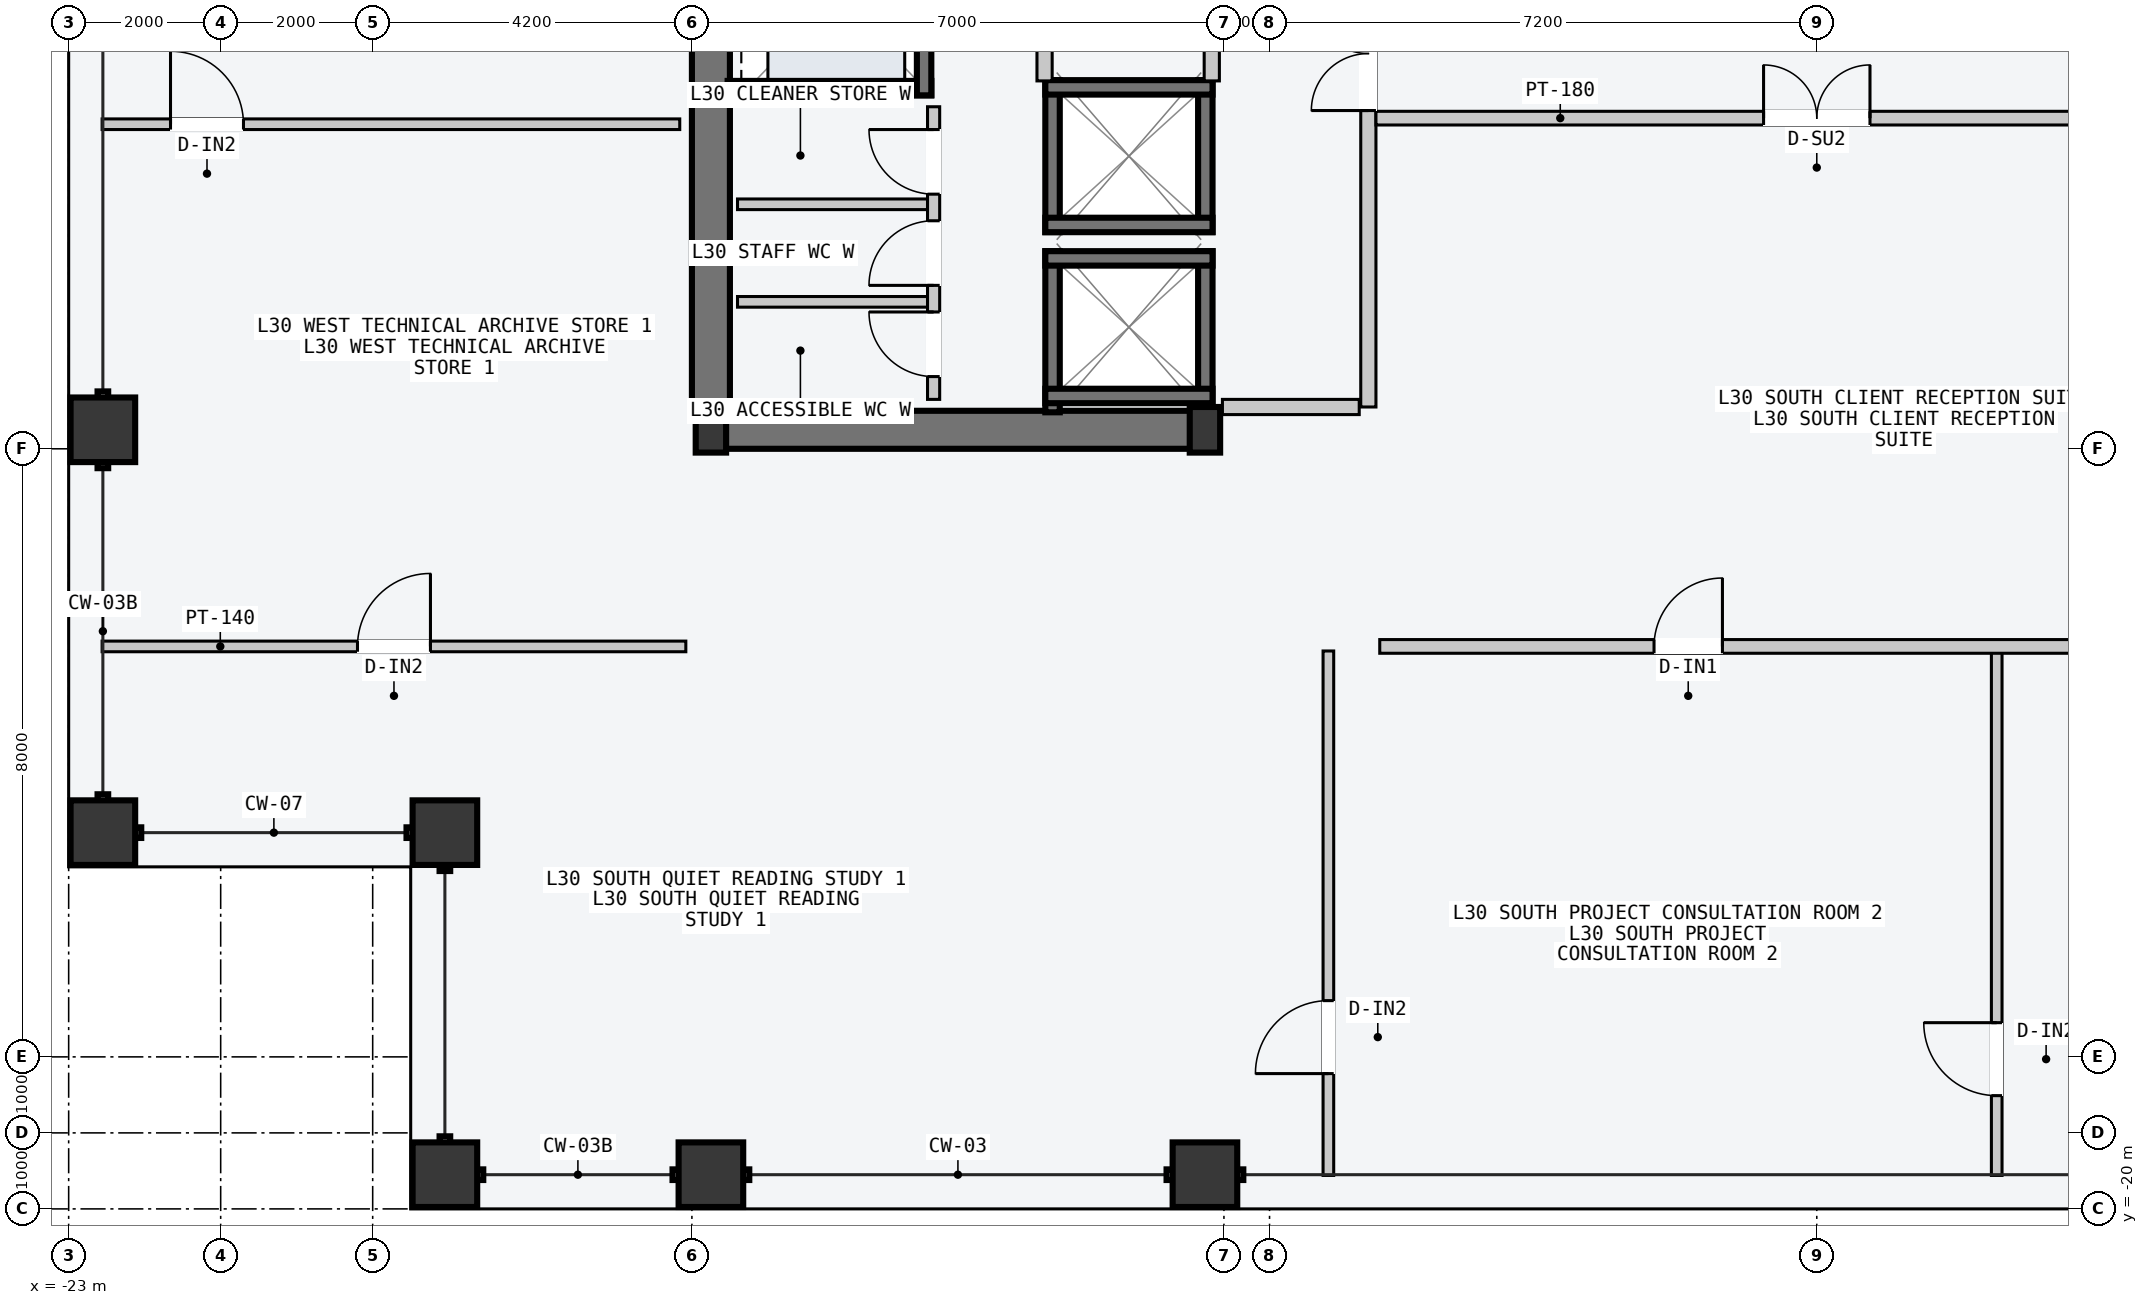
"""IFC4 building model, lengths in metres.
Left out: names, types, materials, properties, quantities, classifications, styles, units other than length and angle.
Written with IfcOpenShell. Run it as: python <this file> out.ifc"""

import sys

from ifc_helpers import new_model, si_unit, direction, frame, frame_2d, origin, origin_2d, place, context, subcontext, project, spatial, rectangle, hollow_rectangle, i_section, extrude, element, fill, save


model = new_model("IFC4")
c1 = context("Model", 3, precision=1e-05, world=origin(), true_north=direction((0.0, 1.0)))
c2 = subcontext(c1, "Body", "Model", "MODEL_VIEW")
j1 = project(units=[si_unit("LENGTHUNIT", "METRE"), si_unit("PLANEANGLEUNIT", "RADIAN")], contexts=[c1])
p1 = place(None, origin())
s1 = spatial("IfcSite", under=j1, at=p1, CompositionType="ELEMENT")
p2 = place(p1, origin())
s2 = spatial("IfcBuilding", under=s1, at=p2, CompositionType="ELEMENT")
p3 = place(p2, frame((0.0, 0.0, 117.0)))
s3 = spatial("IfcBuildingStorey", under=s2, at=p3, CompositionType="ELEMENT", Elevation=117.0)
p4 = place(p3, frame((-14.53, -9.75, -0.2), z_axis=(0.0, 0.0, 1.0), x_axis=(1.0, 0.0, 0.0)))
e1 = element("IfcWall", 1, at=p4, inside=s3, PredefinedType="SHEAR", context=c2, shape_type="SweptSolid", body=[
    extrude(rectangle(XDim=6.46, YDim=0.5, at=frame_2d((3.23, 0.0))), origin(), (0.0, 0.0, 1.0), 3.6),
])
p5 = place(p3, frame((-14.55, -9.45, -0.2), z_axis=(0.0, 0.0, 1.0), x_axis=(0.0, 1.0, 0.0)))
e2 = element("IfcWall", 2, at=p5, inside=s3, PredefinedType="SHEAR", context=c2, shape_type="SweptSolid", body=[
    extrude(rectangle(XDim=9.15, YDim=0.5, at=frame_2d((4.575, 0.0))), origin(), (0.0, 0.0, 1.0), 3.6),
])
for number, where, z_axis, x_axis in (
    (3, (-14.55, -9.75, 0.0), (0.0, 0.0, 1.0), (1.0, 0.0, 0.0)),
    (4, (-8.05, -9.75, 0.0), (0.0, 0.0, 1.0), (1.0, 0.0, 0.0)),
):
    element("IfcColumn", number, at=place(p3, frame(where, z_axis=z_axis, x_axis=x_axis)), inside=s3, PredefinedType="COLUMN", context=c2, shape_type="SweptSolid", body=[
        extrude(i_section(OverallWidth=0.4, OverallDepth=0.6, WebThickness=0.022, FlangeThickness=0.036, at=origin_2d()), origin(), (0.0, 0.0, 1.0), 3.6),
    ])
for number, where, z_axis, x_axis in (
    (5, (-18.05, -19.55, 0.0), (0.0, 0.0, 1.0), (1.0, 0.0, 0.0)),
    (6, (-14.55, -19.55, 0.0), (0.0, 0.0, 1.0), (1.0, 0.0, 0.0)),
    (7, (-8.05, -19.55, 0.0), (0.0, 0.0, 1.0), (1.0, 0.0, 0.0)),
    (8, (-22.55, -15.05, 0.0), (0.0, 0.0, 1.0), (0.0, 1.0, 0.0)),
    (9, (-22.55, -9.75, 0.0), (0.0, 0.0, 1.0), (0.0, 1.0, 0.0)),
    (10, (-18.05, -15.05, 0.0), (0.0, 0.0, 1.0), (1.0, 0.0, 0.0)),
):
    element("IfcColumn", number, at=place(p3, frame(where, z_axis=z_axis, x_axis=x_axis)), inside=s3, PredefinedType="COLUMN", context=c2, shape_type="SweptSolid", body=[
        extrude(hollow_rectangle(XDim=0.85, YDim=0.85, WallThickness=0.04, at=origin_2d()), origin(), (0.0, 0.0, 1.0), 3.6),
    ])
for number, where, z_axis, x_axis in (
    (11, (-8.045, -9.52, -0.2), (0.0, 0.0, 1.0), (0.0, 1.0, 0.0)),
    (12, (-10.055, -9.52, -0.2), (0.0, 0.0, 1.0), (0.0, 1.0, 0.0)),
):
    element("IfcWall", number, at=place(p3, frame(where, z_axis=z_axis, x_axis=x_axis)), inside=s3, PredefinedType="SOLIDWALL", context=c2, shape_type="SweptSolid", body=[
        extrude(rectangle(XDim=2.12, YDim=0.19, at=frame_2d((1.06, 0.0))), origin(), (0.0, 0.0, 1.0), 3.6),
    ])
for number, where, z_axis, x_axis in (
    (13, (-10.15, -7.495, -0.2), (0.0, 0.0, 1.0), (1.0, 0.0, 0.0)),
    (14, (-10.15, -9.305, -0.2), (0.0, 0.0, 1.0), (1.0, 0.0, 0.0)),
):
    element("IfcWall", number, at=place(p3, frame(where, z_axis=z_axis, x_axis=x_axis)), inside=s3, PredefinedType="SOLIDWALL", context=c2, shape_type="SweptSolid", body=[
        extrude(rectangle(XDim=2.2, YDim=0.19, at=frame_2d((1.1, 0.0))), origin(), (0.0, 0.0, 1.0), 3.6),
    ])
for number, where, z_axis, x_axis in (
    (15, (-8.045, -7.15, -0.2), (0.0, 0.0, 1.0), (0.0, 1.0, 0.0)),
    (16, (-10.055, -7.15, -0.2), (0.0, 0.0, 1.0), (0.0, 1.0, 0.0)),
):
    element("IfcWall", number, at=place(p3, frame(where, z_axis=z_axis, x_axis=x_axis)), inside=s3, PredefinedType="SOLIDWALL", context=c2, shape_type="SweptSolid", body=[
        extrude(rectangle(XDim=2.0, YDim=0.19, at=frame_2d((1.0, 0.0))), origin(), (0.0, 0.0, 1.0), 3.6),
    ])
for number, where, z_axis, x_axis in (
    (17, (-10.15, -5.245, -0.2), (0.0, 0.0, 1.0), (1.0, 0.0, 0.0)),
    (18, (-10.15, -7.055, -0.2), (0.0, 0.0, 1.0), (1.0, 0.0, 0.0)),
):
    element("IfcWall", number, at=place(p3, frame(where, z_axis=z_axis, x_axis=x_axis)), inside=s3, PredefinedType="SOLIDWALL", context=c2, shape_type="SweptSolid", body=[
        extrude(rectangle(XDim=2.2, YDim=0.19, at=frame_2d((1.1, 0.0))), origin(), (0.0, 0.0, 1.0), 3.6),
    ])
p6 = place(p3, frame((-14.33, -5.255, -0.2), z_axis=(0.0, 0.0, 1.0), x_axis=(1.0, 0.0, 0.0)))
e19 = element("IfcWall", 19, at=p6, inside=s3, PredefinedType="SOLIDWALL", context=c2, shape_type="SweptSolid", body=[
    extrude(rectangle(XDim=2.68, YDim=0.19, at=frame_2d((1.34, 0.0))), origin(), (0.0, 0.0, 1.0), 3.6),
])
p7 = place(p3, frame((-11.745, -5.35, -0.2), z_axis=(0.0, 0.0, 1.0), x_axis=(0.0, 1.0, 0.0)))
e20 = element("IfcWall", 20, at=p7, inside=s3, PredefinedType="SOLIDWALL", context=c2, shape_type="SweptSolid", body=[
    extrude(rectangle(XDim=2.6, YDim=0.19, at=frame_2d((1.3, 0.0))), origin(), (0.0, 0.0, 1.0), 3.6),
])
p8 = place(p3, frame((-5.9, -9.45, 0.0), z_axis=(0.0, 0.0, 1.0), x_axis=(0.0, 1.0, 0.0)))
e21 = element("IfcWall", 21, at=p8, inside=s3, PredefinedType="PARTITIONING", context=c2, shape_type="SweptSolid", body=[
    extrude(rectangle(XDim=10.5, YDim=0.2, at=frame_2d((5.25, 0.0))), origin(), (0.0, 0.0, 1.0), 3.4),
])
p9 = place(p8, frame((3.9, 0.0, 0.0)))
e22 = element("IfcOpeningElement", 22, at=p9, cuts=e21, PredefinedType="OPENING", context=c2, shape_type="SweptSolid", body=[
    extrude(rectangle(XDim=1.5, YDim=2.2, at=frame_2d((0.75, 1.1))), frame((0.0, 0.11, 0.0), z_axis=(0.0, -1.0, 0.0), x_axis=(1.0, 0.0, 0.0)), (0.0, 0.0, 1.0), 0.22),
])
p10 = place(p3, frame((-6.02, -9.45, 0.0), z_axis=(0.0, 0.0, 1.0), x_axis=(-1.0, 0.0, 0.0)))
e23 = element("IfcWall", 23, at=p10, inside=s3, PredefinedType="PARTITIONING", context=c2, shape_type="SweptSolid", body=[
    extrude(rectangle(XDim=1.8, YDim=0.2, at=frame_2d((0.9, 0.0))), origin(), (0.0, 0.0, 1.0), 3.4),
])
for number, where, z_axis, x_axis in (
    (24, (-7.96, -5.16, 0.0), (0.0, 0.0, 1.0), (0.0, 1.0, 0.0)),
    (25, (-10.16, -5.16, 0.0), (0.0, 0.0, 1.0), (0.0, 1.0, 0.0)),
):
    element("IfcWall", number, at=place(p3, frame(where, z_axis=z_axis, x_axis=x_axis)), inside=s3, PredefinedType="PARTITIONING", context=c2, shape_type="SweptSolid", body=[
        extrude(rectangle(XDim=2.44, YDim=0.2, at=frame_2d((1.22, 0.0))), origin(), (0.0, 0.0, 1.0), 3.4),
    ])
for number, where, z_axis, x_axis in (
    (26, (-11.7, -8.067, 0.0), (0.0, 0.0, 1.0), (-1.0, 0.0, 0.0)),
    (27, (-11.7, -6.783, 0.0), (0.0, 0.0, 1.0), (-1.0, 0.0, 0.0)),
):
    element("IfcWall", number, at=place(p3, frame(where, z_axis=z_axis, x_axis=x_axis)), inside=s3, PredefinedType="PARTITIONING", context=c2, shape_type="SweptSolid", body=[
        extrude(rectangle(XDim=2.5, YDim=0.14, at=frame_2d((1.25, 0.0))), origin(), (0.0, 0.0, 1.0), 3.4),
    ])
p11 = place(p3, frame((-11.62, -9.35, 0.0), z_axis=(0.0, 0.0, 1.0), x_axis=(0.0, 1.0, 0.0)))
e28 = element("IfcWall", 28, at=p11, inside=s3, PredefinedType="PARTITIONING", context=c2, shape_type="SweptSolid", body=[
    extrude(rectangle(XDim=3.85, YDim=0.16, at=frame_2d((1.925, 0.0))), origin(), (0.0, 0.0, 1.0), 3.4),
])
p12 = place(p11, frame((0.3, 0.0, 0.0)))
e29 = element("IfcOpeningElement", 29, at=p12, cuts=e28, PredefinedType="OPENING", context=c2, shape_type="SweptSolid", body=[
    extrude(rectangle(XDim=0.85, YDim=2.12, at=frame_2d((0.425, 1.06))), frame((0.0, 0.09, 0.0), z_axis=(0.0, -1.0, 0.0), x_axis=(1.0, 0.0, 0.0)), (0.0, 0.0, 1.0), 0.18),
])
p13 = place(p11, frame((1.5, 0.0, 0.0)))
e30 = element("IfcOpeningElement", 30, at=p13, cuts=e28, PredefinedType="OPENING", context=c2, shape_type="SweptSolid", body=[
    extrude(rectangle(XDim=0.85, YDim=2.12, at=frame_2d((0.425, 1.06))), frame((0.0, 0.09, 0.0), z_axis=(0.0, -1.0, 0.0), x_axis=(1.0, 0.0, 0.0)), (0.0, 0.0, 1.0), 0.18),
])
p14 = place(p11, frame((2.7, 0.0, 0.0)))
e31 = element("IfcOpeningElement", 31, at=p14, cuts=e28, PredefinedType="OPENING", context=c2, shape_type="SweptSolid", body=[
    extrude(rectangle(XDim=0.85, YDim=2.12, at=frame_2d((0.425, 1.06))), frame((0.0, 0.09, 0.0), z_axis=(0.0, -1.0, 0.0), x_axis=(1.0, 0.0, 0.0)), (0.0, 0.0, 1.0), 0.18),
])
p15 = place(p3, frame((-5.8, -5.65, 0.0), z_axis=(0.0, 0.0, 1.0), x_axis=(1.0, 0.0, 0.0)))
e32 = element("IfcWall", 32, at=p15, inside=s3, PredefinedType="PARTITIONING", context=c2, shape_type="SweptSolid", body=[
    extrude(rectangle(XDim=11.6, YDim=0.18, at=frame_2d((5.8, 0.0))), origin(), (0.0, 0.0, 1.0), 3.4),
])
p16 = place(p15, frame((5.1, 0.0, 0.0)))
e33 = element("IfcOpeningElement", 33, at=p16, cuts=e32, PredefinedType="OPENING", context=c2, shape_type="SweptSolid", body=[
    extrude(rectangle(XDim=1.4, YDim=2.2, at=frame_2d((0.7, 1.1))), frame((0.0, 0.1, 0.0), z_axis=(0.0, -1.0, 0.0), x_axis=(1.0, 0.0, 0.0)), (0.0, 0.0, 1.0), 0.2),
])
p17 = place(p3, frame((-6.426, -19.56, 0.0), z_axis=(0.0, 0.0, 1.0), x_axis=(0.0, 1.0, 0.0)))
e34 = element("IfcWall", 34, at=p17, inside=s3, PredefinedType="PARTITIONING", context=c2, shape_type="SweptSolid", body=[
    extrude(rectangle(XDim=6.9, YDim=0.14, at=frame_2d((3.45, 0.0))), origin(), (0.0, 0.0, 1.0), 3.4),
])
p18 = place(p17, frame((1.34, 0.0, 0.0)))
e35 = element("IfcOpeningElement", 35, at=p18, cuts=e34, PredefinedType="OPENING", context=c2, shape_type="SweptSolid", body=[
    extrude(rectangle(XDim=0.96, YDim=2.18, at=frame_2d((0.48, 1.09))), frame((0.0, 0.08, 0.0), z_axis=(0.0, -1.0, 0.0), x_axis=(1.0, 0.0, 0.0)), (0.0, 0.0, 1.0), 0.16),
])
p19 = place(p3, frame((2.367, -19.56, 0.0), z_axis=(0.0, 0.0, 1.0), x_axis=(0.0, 1.0, 0.0)))
e36 = element("IfcWall", 36, at=p19, inside=s3, PredefinedType="PARTITIONING", context=c2, shape_type="SweptSolid", body=[
    extrude(rectangle(XDim=6.9, YDim=0.14, at=frame_2d((3.45, 0.0))), origin(), (0.0, 0.0, 1.0), 3.4),
])
p20 = place(p19, frame((1.05, 0.0, 0.0)))
e37 = element("IfcOpeningElement", 37, at=p20, cuts=e36, PredefinedType="OPENING", context=c2, shape_type="SweptSolid", body=[
    extrude(rectangle(XDim=0.96, YDim=2.18, at=frame_2d((0.48, 1.09))), frame((0.0, 0.08, 0.0), z_axis=(0.0, -1.0, 0.0), x_axis=(1.0, 0.0, 0.0)), (0.0, 0.0, 1.0), 0.16),
])
p21 = place(p3, frame((-5.75, -12.6, 0.0), z_axis=(0.0, 0.0, 1.0), x_axis=(1.0, 0.0, 0.0)))
e38 = element("IfcWall", 38, at=p21, inside=s3, PredefinedType="PARTITIONING", context=c2, shape_type="SweptSolid", body=[
    extrude(rectangle(XDim=11.5, YDim=0.18, at=frame_2d((5.75, 0.0))), origin(), (0.0, 0.0, 1.0), 3.4),
])
p22 = place(p21, frame((3.609, 0.0, 0.0)))
e39 = element("IfcOpeningElement", 39, at=p22, cuts=e38, PredefinedType="OPENING", context=c2, shape_type="SweptSolid", body=[
    extrude(rectangle(XDim=0.9, YDim=2.15, at=frame_2d((0.45, 1.075))), frame((0.0, 0.1, 0.0), z_axis=(0.0, -1.0, 0.0), x_axis=(1.0, 0.0, 0.0)), (0.0, 0.0, 1.0), 0.2),
])
p23 = place(p21, frame((9.329, 0.0, 0.0)))
e40 = element("IfcOpeningElement", 40, at=p23, cuts=e38, PredefinedType="OPENING", context=c2, shape_type="SweptSolid", body=[
    extrude(rectangle(XDim=0.96, YDim=2.18, at=frame_2d((0.48, 1.09))), frame((0.0, 0.1, 0.0), z_axis=(0.0, -1.0, 0.0), x_axis=(1.0, 0.0, 0.0)), (0.0, 0.0, 1.0), 0.2),
])
p24 = place(p3, frame((-22.56, -12.6, 0.0), z_axis=(0.0, 0.0, 1.0), x_axis=(1.0, 0.0, 0.0)))
e41 = element("IfcWall", 41, at=p24, inside=s3, PredefinedType="PARTITIONING", context=c2, shape_type="SweptSolid", body=[
    extrude(rectangle(XDim=7.68, YDim=0.14, at=frame_2d((3.84, 0.0))), origin(), (0.0, 0.0, 1.0), 3.4),
])
p25 = place(p24, frame((3.36, 0.0, 0.0)))
e42 = element("IfcOpeningElement", 42, at=p25, cuts=e41, PredefinedType="OPENING", context=c2, shape_type="SweptSolid", body=[
    extrude(rectangle(XDim=0.96, YDim=2.18, at=frame_2d((0.48, 1.09))), frame((0.0, 0.08, 0.0), z_axis=(0.0, -1.0, 0.0), x_axis=(1.0, 0.0, 0.0)), (0.0, 0.0, 1.0), 0.16),
])
p26 = place(p3, frame((-22.56, -5.73, 0.0), z_axis=(0.0, 0.0, 1.0), x_axis=(1.0, 0.0, 0.0)))
e43 = element("IfcWall", 43, at=p26, inside=s3, PredefinedType="PARTITIONING", context=c2, shape_type="SweptSolid", body=[
    extrude(rectangle(XDim=7.6, YDim=0.14, at=frame_2d((3.8, 0.0))), origin(), (0.0, 0.0, 1.0), 3.4),
])
p27 = place(p26, frame((0.9, 0.0, 0.0)))
e44 = element("IfcOpeningElement", 44, at=p27, cuts=e43, PredefinedType="OPENING", context=c2, shape_type="SweptSolid", body=[
    extrude(rectangle(XDim=0.96, YDim=2.18, at=frame_2d((0.48, 1.09))), frame((0.0, 0.08, 0.0), z_axis=(0.0, -1.0, 0.0), x_axis=(1.0, 0.0, 0.0)), (0.0, 0.0, 1.0), 0.16),
])
p28 = place(p9, origin())
e45 = element("IfcDoor", 45, at=p28, inside=s3, OperationType="DOUBLE_DOOR_SINGLE_SWING", PredefinedType="DOOR", context=c2, shape_type="SweptSolid", body=[
    extrude(rectangle(XDim=1.5, YDim=2.2, at=frame_2d((0.75, 1.1))), frame((0.0, 0.025, 0.0), z_axis=(0.0, -1.0, 0.0), x_axis=(1.0, 0.0, 0.0)), (0.0, 0.0, 1.0), 0.05),
])
fill(e22, e45)
p29 = place(p12, origin())
e46 = element("IfcDoor", 46, at=p29, inside=s3, OperationType="SINGLE_SWING_RIGHT", PredefinedType="DOOR", context=c2, shape_type="SweptSolid", body=[
    extrude(rectangle(XDim=0.85, YDim=2.12, at=frame_2d((0.425, 1.06))), frame((0.0, 0.025, 0.0), z_axis=(0.0, -1.0, 0.0), x_axis=(1.0, 0.0, 0.0)), (0.0, 0.0, 1.0), 0.05),
])
fill(e29, e46)
p30 = place(p13, origin())
e47 = element("IfcDoor", 47, at=p30, inside=s3, OperationType="SINGLE_SWING_LEFT", PredefinedType="DOOR", context=c2, shape_type="SweptSolid", body=[
    extrude(rectangle(XDim=0.85, YDim=2.12, at=frame_2d((0.425, 1.06))), frame((0.0, 0.025, 0.0), z_axis=(0.0, -1.0, 0.0), x_axis=(1.0, 0.0, 0.0)), (0.0, 0.0, 1.0), 0.05),
])
fill(e30, e47)
p31 = place(p14, origin())
e48 = element("IfcDoor", 48, at=p31, inside=s3, OperationType="SINGLE_SWING_RIGHT", PredefinedType="DOOR", context=c2, shape_type="SweptSolid", body=[
    extrude(rectangle(XDim=0.85, YDim=2.12, at=frame_2d((0.425, 1.06))), frame((0.0, 0.025, 0.0), z_axis=(0.0, -1.0, 0.0), x_axis=(1.0, 0.0, 0.0)), (0.0, 0.0, 1.0), 0.05),
])
fill(e31, e48)
p32 = place(p16, origin())
e49 = element("IfcDoor", 49, at=p32, inside=s3, OperationType="DOUBLE_DOOR_SINGLE_SWING", PredefinedType="DOOR", context=c2, shape_type="SweptSolid", body=[
    extrude(rectangle(XDim=1.4, YDim=2.2, at=frame_2d((0.7, 1.1))), frame((0.0, 0.025, 0.0), z_axis=(0.0, -1.0, 0.0), x_axis=(1.0, 0.0, 0.0)), (0.0, 0.0, 1.0), 0.05),
])
fill(e33, e49)
p33 = place(p18, origin())
e50 = element("IfcDoor", 50, at=p33, inside=s3, OperationType="SINGLE_SWING_LEFT", PredefinedType="DOOR", context=c2, shape_type="SweptSolid", body=[
    extrude(rectangle(XDim=0.96, YDim=2.18, at=frame_2d((0.48, 1.09))), frame((0.0, 0.025, 0.0), z_axis=(0.0, -1.0, 0.0), x_axis=(1.0, 0.0, 0.0)), (0.0, 0.0, 1.0), 0.05),
])
fill(e35, e50)
p34 = place(p20, origin())
e51 = element("IfcDoor", 51, at=p34, inside=s3, OperationType="SINGLE_SWING_RIGHT", PredefinedType="DOOR", context=c2, shape_type="SweptSolid", body=[
    extrude(rectangle(XDim=0.96, YDim=2.18, at=frame_2d((0.48, 1.09))), frame((0.0, 0.025, 0.0), z_axis=(0.0, -1.0, 0.0), x_axis=(1.0, 0.0, 0.0)), (0.0, 0.0, 1.0), 0.05),
])
fill(e37, e51)
p35 = place(p22, origin())
e52 = element("IfcDoor", 52, at=p35, inside=s3, OperationType="SINGLE_SWING_RIGHT", PredefinedType="DOOR", context=c2, shape_type="SweptSolid", body=[
    extrude(rectangle(XDim=0.9, YDim=2.15, at=frame_2d((0.45, 1.075))), frame((0.0, 0.025, 0.0), z_axis=(0.0, -1.0, 0.0), x_axis=(1.0, 0.0, 0.0)), (0.0, 0.0, 1.0), 0.05),
])
fill(e39, e52)
p36 = place(p25, origin())
e53 = element("IfcDoor", 53, at=p36, inside=s3, OperationType="SINGLE_SWING_RIGHT", PredefinedType="DOOR", context=c2, shape_type="SweptSolid", body=[
    extrude(rectangle(XDim=0.96, YDim=2.18, at=frame_2d((0.48, 1.09))), frame((0.0, 0.025, 0.0), z_axis=(0.0, -1.0, 0.0), x_axis=(1.0, 0.0, 0.0)), (0.0, 0.0, 1.0), 0.05),
])
fill(e42, e53)
p37 = place(p27, origin())
e54 = element("IfcDoor", 54, at=p37, inside=s3, OperationType="SINGLE_SWING_LEFT", PredefinedType="DOOR", context=c2, shape_type="SweptSolid", body=[
    extrude(rectangle(XDim=0.96, YDim=2.18, at=frame_2d((0.48, 1.09))), frame((0.0, 0.025, 0.0), z_axis=(0.0, -1.0, 0.0), x_axis=(1.0, 0.0, 0.0)), (0.0, 0.0, 1.0), 0.05),
])
fill(e44, e54)
save(model, sys.argv[1])
